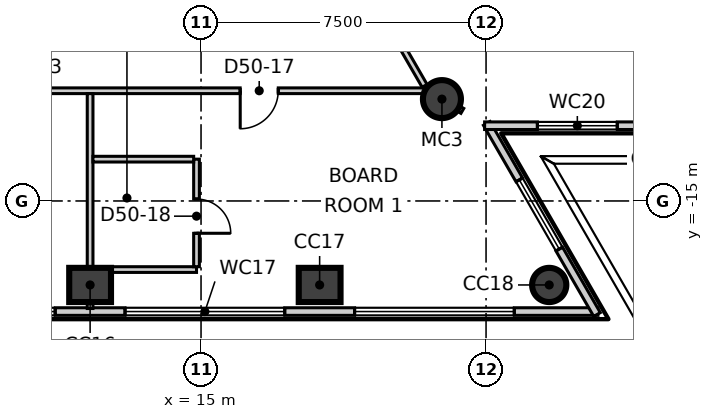
"""IFC4 building model, lengths in metres.
Left out: names, types, materials, properties, quantities, classifications, styles, units other than length and angle.
Written with IfcOpenShell. Run it as: python <this file> out.ifc"""

import sys

from ifc_helpers import new_model, si_unit, direction, frame, frame_2d, origin, origin_2d, place, context, subcontext, project, spatial, rectangle, circle, extrude, element, fill, save


model = new_model("IFC4")
c1 = context("Model", 3, precision=1e-05, world=origin(), true_north=direction((0.0, 1.0)))
c2 = subcontext(c1, "Body", "Model", "MODEL_VIEW")
j1 = project(units=[si_unit("LENGTHUNIT", "METRE"), si_unit("PLANEANGLEUNIT", "RADIAN")], contexts=[c1])
p1 = place(None, origin())
s1 = spatial("IfcSite", under=j1, at=p1, CompositionType="ELEMENT")
p2 = place(p1, origin())
s2 = spatial("IfcBuilding", under=s1, at=p2, CompositionType="ELEMENT")
p3 = place(p2, frame((0.0, 0.0, 215.3)))
s3 = spatial("IfcBuildingStorey", under=s2, at=p3, CompositionType="ELEMENT", Elevation=215.3)
for number, where, z_axis, x_axis in (
    (1, (12.081, -17.21, -0.3), (0.0, 0.0, 1.0), (1.0, 0.0, 0.0)),
    (2, (18.121, -17.21, -0.3), (0.0, 0.0, 1.0), (1.0, 0.0, 0.0)),
):
    element("IfcColumn", number, at=place(p3, frame(where, z_axis=z_axis, x_axis=x_axis)), inside=s3, PredefinedType="COLUMN", context=c2, shape_type="SweptSolid", body=[
        extrude(rectangle(XDim=1.1, YDim=0.9, at=origin_2d()), origin(), (0.0, 0.0, 1.0), 4.0),
    ])
p4 = place(p3, frame((24.162, -17.21, -0.3), z_axis=(0.0, 0.0, 1.0), x_axis=(1.0, 0.0, 0.0)))
e3 = element("IfcColumn", 3, at=p4, inside=s3, PredefinedType="COLUMN", context=c2, shape_type="SweptSolid", body=[
    extrude(circle(Radius=0.45, at=origin_2d()), origin(), (0.0, 0.0, 1.0), 4.0),
])
p5 = place(p3, frame((21.339, -12.32, -0.3), z_axis=(0.0, 0.0, 1.0), x_axis=(1.0, 0.0, 0.0)))
e4 = element("IfcColumn", 4, at=p5, inside=s3, PredefinedType="COLUMN", context=c2, shape_type="SweptSolid", body=[
    extrude(circle(Radius=0.5, at=origin_2d()), origin(), (0.0, 0.0, 1.0), 4.0),
])
p6 = place(p3, frame((-25.465, -17.91, 0.0), z_axis=(0.0, 0.0, 1.0), x_axis=(1.0, 0.0, 0.0)))
e5 = element("IfcWall", 5, at=p6, inside=s3, PredefinedType="ELEMENTEDWALL", context=c2, shape_type="SweptSolid", body=[
    extrude(rectangle(XDim=50.91, YDim=0.2, at=frame_2d((25.455, 0.0))), origin(), (0.0, 0.0, 1.0), 3.7),
])
p7 = place(p6, frame((2.223, 0.0, 0.9)))
e6 = element("IfcOpeningElement", 6, at=p7, cuts=e5, PredefinedType="OPENING", context=c2, shape_type="SweptSolid", body=[
    extrude(rectangle(XDim=4.2, YDim=2.5, at=frame_2d((2.1, 1.25))), frame((0.0, 0.11, 0.0), z_axis=(0.0, -1.0, 0.0), x_axis=(1.0, 0.0, 0.0)), (0.0, 0.0, 1.0), 0.22),
])
p8 = place(p6, frame((8.264, 0.0, 0.9)))
e7 = element("IfcOpeningElement", 7, at=p8, cuts=e5, PredefinedType="OPENING", context=c2, shape_type="SweptSolid", body=[
    extrude(rectangle(XDim=4.2, YDim=2.5, at=frame_2d((2.1, 1.25))), frame((0.0, 0.11, 0.0), z_axis=(0.0, -1.0, 0.0), x_axis=(1.0, 0.0, 0.0)), (0.0, 0.0, 1.0), 0.22),
])
p9 = place(p6, frame((14.304, 0.0, 0.9)))
e8 = element("IfcOpeningElement", 8, at=p9, cuts=e5, PredefinedType="OPENING", context=c2, shape_type="SweptSolid", body=[
    extrude(rectangle(XDim=4.2, YDim=2.5, at=frame_2d((2.1, 1.25))), frame((0.0, 0.11, 0.0), z_axis=(0.0, -1.0, 0.0), x_axis=(1.0, 0.0, 0.0)), (0.0, 0.0, 1.0), 0.22),
])
p10 = place(p6, frame((20.345, 0.0, 0.9)))
e9 = element("IfcOpeningElement", 9, at=p10, cuts=e5, PredefinedType="OPENING", context=c2, shape_type="SweptSolid", body=[
    extrude(rectangle(XDim=4.2, YDim=2.5, at=frame_2d((2.1, 1.25))), frame((0.0, 0.11, 0.0), z_axis=(0.0, -1.0, 0.0), x_axis=(1.0, 0.0, 0.0)), (0.0, 0.0, 1.0), 0.22),
])
p11 = place(p6, frame((26.385, 0.0, 0.9)))
e10 = element("IfcOpeningElement", 10, at=p11, cuts=e5, PredefinedType="OPENING", context=c2, shape_type="SweptSolid", body=[
    extrude(rectangle(XDim=4.2, YDim=2.5, at=frame_2d((2.1, 1.25))), frame((0.0, 0.11, 0.0), z_axis=(0.0, -1.0, 0.0), x_axis=(1.0, 0.0, 0.0)), (0.0, 0.0, 1.0), 0.22),
])
p12 = place(p6, frame((32.426, 0.0, 0.9)))
e11 = element("IfcOpeningElement", 11, at=p12, cuts=e5, PredefinedType="OPENING", context=c2, shape_type="SweptSolid", body=[
    extrude(rectangle(XDim=4.2, YDim=2.5, at=frame_2d((2.1, 1.25))), frame((0.0, 0.11, 0.0), z_axis=(0.0, -1.0, 0.0), x_axis=(1.0, 0.0, 0.0)), (0.0, 0.0, 1.0), 0.22),
])
p13 = place(p6, frame((38.466, 0.0, 0.9)))
e12 = element("IfcOpeningElement", 12, at=p13, cuts=e5, PredefinedType="OPENING", context=c2, shape_type="SweptSolid", body=[
    extrude(rectangle(XDim=4.2, YDim=2.5, at=frame_2d((2.1, 1.25))), frame((0.0, 0.11, 0.0), z_axis=(0.0, -1.0, 0.0), x_axis=(1.0, 0.0, 0.0)), (0.0, 0.0, 1.0), 0.22),
])
p14 = place(p6, frame((44.507, 0.0, 0.9)))
e13 = element("IfcOpeningElement", 13, at=p14, cuts=e5, PredefinedType="OPENING", context=c2, shape_type="SweptSolid", body=[
    extrude(rectangle(XDim=4.2, YDim=2.5, at=frame_2d((2.1, 1.25))), frame((0.0, 0.11, 0.0), z_axis=(0.0, -1.0, 0.0), x_axis=(1.0, 0.0, 0.0)), (0.0, 0.0, 1.0), 0.22),
])
p15 = place(p3, frame((25.42, -17.988, 0.0), z_axis=(0.0, 0.0, 1.0), x_axis=(-0.499910499212, 0.866077070922, 0.0)))
e14 = element("IfcWall", 14, at=p15, inside=s3, PredefinedType="ELEMENTEDWALL", context=c2, shape_type="SweptSolid", body=[
    extrude(rectangle(XDim=5.807, YDim=0.2, at=frame_2d((2.903, 0.0))), origin(), (0.0, 0.0, 1.0), 3.7),
])
p16 = place(p15, frame((1.99, 0.0, 0.9)))
e15 = element("IfcOpeningElement", 15, at=p16, cuts=e14, PredefinedType="OPENING", context=c2, shape_type="SweptSolid", body=[
    extrude(rectangle(XDim=2.1, YDim=2.5, at=frame_2d((1.05, 1.25))), frame((0.0, 0.11, 0.0), z_axis=(0.0, -1.0, 0.0), x_axis=(1.0, 0.0, 0.0)), (0.0, 0.0, 1.0), 0.22),
])
p17 = place(p3, frame((22.462, -13.02, 0.0), z_axis=(0.0, 0.0, 1.0), x_axis=(1.0, 0.0, 0.0)))
e16 = element("IfcWall", 16, at=p17, inside=s3, PredefinedType="ELEMENTEDWALL", context=c2, shape_type="SweptSolid", body=[
    extrude(rectangle(XDim=5.806, YDim=0.2, at=frame_2d((2.903, 0.0))), origin(), (0.0, 0.0, 1.0), 3.7),
])
p18 = place(p17, frame((1.39, 0.0, 0.9)))
e17 = element("IfcOpeningElement", 17, at=p18, cuts=e16, PredefinedType="OPENING", context=c2, shape_type="SweptSolid", body=[
    extrude(rectangle(XDim=2.1, YDim=2.5, at=frame_2d((1.05, 1.25))), frame((0.0, 0.11, 0.0), z_axis=(0.0, -1.0, 0.0), x_axis=(1.0, 0.0, 0.0)), (0.0, 0.0, 1.0), 0.22),
])
p19 = place(p3, frame((28.243, -13.098, 0.0), z_axis=(0.0, 0.0, 1.0), x_axis=(-0.500001688958, 0.866024428662, 0.0)))
e18 = element("IfcWall", 18, at=p19, inside=s3, PredefinedType="ELEMENTEDWALL", context=c2, shape_type="SweptSolid", body=[
    extrude(rectangle(XDim=50.909, YDim=0.2, at=frame_2d((25.455, 0.0))), origin(), (0.0, 0.0, 1.0), 3.7),
])
p20 = place(p19, frame((2.223, 0.0, 0.9)))
e19 = element("IfcOpeningElement", 19, at=p20, cuts=e18, PredefinedType="OPENING", context=c2, shape_type="SweptSolid", body=[
    extrude(rectangle(XDim=4.2, YDim=2.5, at=frame_2d((2.1, 1.25))), frame((0.0, 0.11, 0.0), z_axis=(0.0, -1.0, 0.0), x_axis=(1.0, 0.0, 0.0)), (0.0, 0.0, 1.0), 0.22),
])
p21 = place(p19, frame((8.263, 0.0, 0.9)))
e20 = element("IfcOpeningElement", 20, at=p21, cuts=e18, PredefinedType="OPENING", context=c2, shape_type="SweptSolid", body=[
    extrude(rectangle(XDim=4.2, YDim=2.5, at=frame_2d((2.1, 1.25))), frame((0.0, 0.11, 0.0), z_axis=(0.0, -1.0, 0.0), x_axis=(1.0, 0.0, 0.0)), (0.0, 0.0, 1.0), 0.22),
])
p22 = place(p19, frame((14.304, 0.0, 0.9)))
e21 = element("IfcOpeningElement", 21, at=p22, cuts=e18, PredefinedType="OPENING", context=c2, shape_type="SweptSolid", body=[
    extrude(rectangle(XDim=4.2, YDim=2.5, at=frame_2d((2.1, 1.25))), frame((0.0, 0.11, 0.0), z_axis=(0.0, -1.0, 0.0), x_axis=(1.0, 0.0, 0.0)), (0.0, 0.0, 1.0), 0.22),
])
p23 = place(p19, frame((20.345, 0.0, 0.9)))
e22 = element("IfcOpeningElement", 22, at=p23, cuts=e18, PredefinedType="OPENING", context=c2, shape_type="SweptSolid", body=[
    extrude(rectangle(XDim=4.2, YDim=2.5, at=frame_2d((2.1, 1.25))), frame((0.0, 0.11, 0.0), z_axis=(0.0, -1.0, 0.0), x_axis=(1.0, 0.0, 0.0)), (0.0, 0.0, 1.0), 0.22),
])
p24 = place(p19, frame((26.385, 0.0, 0.9)))
e23 = element("IfcOpeningElement", 23, at=p24, cuts=e18, PredefinedType="OPENING", context=c2, shape_type="SweptSolid", body=[
    extrude(rectangle(XDim=4.2, YDim=2.5, at=frame_2d((2.1, 1.25))), frame((0.0, 0.11, 0.0), z_axis=(0.0, -1.0, 0.0), x_axis=(1.0, 0.0, 0.0)), (0.0, 0.0, 1.0), 0.22),
])
p25 = place(p19, frame((32.426, 0.0, 0.9)))
e24 = element("IfcOpeningElement", 24, at=p25, cuts=e18, PredefinedType="OPENING", context=c2, shape_type="SweptSolid", body=[
    extrude(rectangle(XDim=4.2, YDim=2.5, at=frame_2d((2.1, 1.25))), frame((0.0, 0.11, 0.0), z_axis=(0.0, -1.0, 0.0), x_axis=(1.0, 0.0, 0.0)), (0.0, 0.0, 1.0), 0.22),
])
p26 = place(p19, frame((38.466, 0.0, 0.9)))
e25 = element("IfcOpeningElement", 25, at=p26, cuts=e18, PredefinedType="OPENING", context=c2, shape_type="SweptSolid", body=[
    extrude(rectangle(XDim=4.2, YDim=2.5, at=frame_2d((2.1, 1.25))), frame((0.0, 0.11, 0.0), z_axis=(0.0, -1.0, 0.0), x_axis=(1.0, 0.0, 0.0)), (0.0, 0.0, 1.0), 0.22),
])
p27 = place(p19, frame((44.507, 0.0, 0.9)))
e26 = element("IfcOpeningElement", 26, at=p27, cuts=e18, PredefinedType="OPENING", context=c2, shape_type="SweptSolid", body=[
    extrude(rectangle(XDim=4.2, YDim=2.5, at=frame_2d((2.1, 1.25))), frame((0.0, 0.11, 0.0), z_axis=(0.0, -1.0, 0.0), x_axis=(1.0, 0.0, 0.0)), (0.0, 0.0, 1.0), 0.22),
])
p28 = place(p3, frame((-20.808, -12.1, 0.0), z_axis=(0.0, 0.0, 1.0), x_axis=(1.0, 0.0, 0.0)))
e27 = element("IfcWall", 27, at=p28, inside=s3, PredefinedType="PARTITIONING", context=c2, shape_type="SweptSolid", body=[
    extrude(rectangle(XDim=41.766, YDim=0.15, at=frame_2d((20.883, 0.0))), origin(), (0.0, 0.0, 1.0), 3.7),
])
p29 = place(p28, frame((6.8, 0.0, 0.0)))
e28 = element("IfcOpeningElement", 28, at=p29, cuts=e27, PredefinedType="OPENING", context=c2, shape_type="SweptSolid", body=[
    extrude(rectangle(XDim=1.1, YDim=2.1, at=frame_2d((0.55, 1.05))), frame((0.0, 0.085, 0.0), z_axis=(0.0, -1.0, 0.0), x_axis=(1.0, 0.0, 0.0)), (0.0, 0.0, 1.0), 0.17),
])
p30 = place(p28, frame((17.317, 0.0, 0.0)))
e29 = element("IfcOpeningElement", 29, at=p30, cuts=e27, PredefinedType="OPENING", context=c2, shape_type="SweptSolid", body=[
    extrude(rectangle(XDim=1.0, YDim=2.1, at=frame_2d((0.5, 1.05))), frame((0.0, 0.085, 0.0), z_axis=(0.0, -1.0, 0.0), x_axis=(1.0, 0.0, 0.0)), (0.0, 0.0, 1.0), 0.17),
])
p31 = place(p28, frame((30.658, 0.0, 0.0)))
e30 = element("IfcOpeningElement", 30, at=p31, cuts=e27, PredefinedType="OPENING", context=c2, shape_type="SweptSolid", body=[
    extrude(rectangle(XDim=1.1, YDim=2.1, at=frame_2d((0.55, 1.05))), frame((0.0, 0.085, 0.0), z_axis=(0.0, -1.0, 0.0), x_axis=(1.0, 0.0, 0.0)), (0.0, 0.0, 1.0), 0.17),
])
p32 = place(p28, frame((21.958, 0.0, 0.0)))
e31 = element("IfcOpeningElement", 31, at=p32, cuts=e27, PredefinedType="OPENING", context=c2, shape_type="SweptSolid", body=[
    extrude(rectangle(XDim=0.9, YDim=2.1, at=frame_2d((0.45, 1.05))), frame((0.0, 0.085, 0.0), z_axis=(0.0, -1.0, 0.0), x_axis=(1.0, 0.0, 0.0)), (0.0, 0.0, 1.0), 0.17),
])
p33 = place(p28, frame((25.158, 0.0, 0.0)))
e32 = element("IfcOpeningElement", 32, at=p33, cuts=e27, PredefinedType="OPENING", context=c2, shape_type="SweptSolid", body=[
    extrude(rectangle(XDim=0.9, YDim=2.1, at=frame_2d((0.45, 1.05))), frame((0.0, 0.085, 0.0), z_axis=(0.0, -1.0, 0.0), x_axis=(1.0, 0.0, 0.0)), (0.0, 0.0, 1.0), 0.17),
])
p34 = place(p28, frame((27.958, 0.0, 0.0)))
e33 = element("IfcOpeningElement", 33, at=p34, cuts=e27, PredefinedType="OPENING", context=c2, shape_type="SweptSolid", body=[
    extrude(rectangle(XDim=1.0, YDim=2.1, at=frame_2d((0.5, 1.05))), frame((0.0, 0.085, 0.0), z_axis=(0.0, -1.0, 0.0), x_axis=(1.0, 0.0, 0.0)), (0.0, 0.0, 1.0), 0.17),
])
p35 = place(p28, frame((36.839, 0.0, 0.0)))
e34 = element("IfcOpeningElement", 34, at=p35, cuts=e27, PredefinedType="OPENING", context=c2, shape_type="SweptSolid", body=[
    extrude(rectangle(XDim=1.0, YDim=2.1, at=frame_2d((0.5, 1.05))), frame((0.0, 0.085, 0.0), z_axis=(0.0, -1.0, 0.0), x_axis=(1.0, 0.0, 0.0)), (0.0, 0.0, 1.0), 0.17),
])
p36 = place(p3, frame((21.087, -12.175, 0.0), z_axis=(0.0, 0.0, 1.0), x_axis=(0.866372959518, -0.499397532049, 0.0)))
e35 = element("IfcWall", 35, at=p36, inside=s3, PredefinedType="PARTITIONING", context=c2, shape_type="SweptSolid", body=[
    extrude(rectangle(XDim=0.911, YDim=0.15, at=frame_2d((0.455, 0.0))), origin(), (0.0, 0.0, 1.0), 3.7),
])
p37 = place(p3, frame((0.075, 24.07, 0.0), z_axis=(0.0, 0.0, 1.0), x_axis=(0.500006834213, -0.866021458014, 0.0)))
e36 = element("IfcWall", 36, at=p37, inside=s3, PredefinedType="PARTITIONING", context=c2, shape_type="SweptSolid", body=[
    extrude(rectangle(XDim=41.616, YDim=0.15, at=frame_2d((20.808, 0.0))), origin(), (0.0, 0.0, 1.0), 3.7),
])
p38 = place(p37, frame((33.715, 0.0, 0.0)))
e37 = element("IfcOpeningElement", 37, at=p38, cuts=e36, PredefinedType="OPENING", context=c2, shape_type="SweptSolid", body=[
    extrude(rectangle(XDim=1.1, YDim=2.1, at=frame_2d((0.55, 1.05))), frame((0.0, 0.085, 0.0), z_axis=(0.0, -1.0, 0.0), x_axis=(1.0, 0.0, 0.0)), (0.0, 0.0, 1.0), 0.17),
])
p39 = place(p37, frame((22.098, 0.0, 0.0)))
e38 = element("IfcOpeningElement", 38, at=p39, cuts=e36, PredefinedType="OPENING", context=c2, shape_type="SweptSolid", body=[
    extrude(rectangle(XDim=1.0, YDim=2.1, at=frame_2d((0.5, 1.05))), frame((0.0, 0.085, 0.0), z_axis=(0.0, -1.0, 0.0), x_axis=(1.0, 0.0, 0.0)), (0.0, 0.0, 1.0), 0.17),
])
p40 = place(p37, frame((25.198, 0.0, 0.0)))
e39 = element("IfcOpeningElement", 39, at=p40, cuts=e36, PredefinedType="OPENING", context=c2, shape_type="SweptSolid", body=[
    extrude(rectangle(XDim=0.9, YDim=2.1, at=frame_2d((0.45, 1.05))), frame((0.0, 0.085, 0.0), z_axis=(0.0, -1.0, 0.0), x_axis=(1.0, 0.0, 0.0)), (0.0, 0.0, 1.0), 0.17),
])
p41 = place(p37, frame((9.858, 0.0, 0.0)))
e40 = element("IfcOpeningElement", 40, at=p41, cuts=e36, PredefinedType="OPENING", context=c2, shape_type="SweptSolid", body=[
    extrude(rectangle(XDim=1.1, YDim=2.1, at=frame_2d((0.55, 1.05))), frame((0.0, 0.085, 0.0), z_axis=(0.0, -1.0, 0.0), x_axis=(1.0, 0.0, 0.0)), (0.0, 0.0, 1.0), 0.17),
])
p42 = place(p37, frame((18.758, 0.0, 0.0)))
e41 = element("IfcOpeningElement", 41, at=p42, cuts=e36, PredefinedType="OPENING", context=c2, shape_type="SweptSolid", body=[
    extrude(rectangle(XDim=0.9, YDim=2.1, at=frame_2d((0.45, 1.05))), frame((0.0, 0.085, 0.0), z_axis=(0.0, -1.0, 0.0), x_axis=(1.0, 0.0, 0.0)), (0.0, 0.0, 1.0), 0.17),
])
p43 = place(p37, frame((15.558, 0.0, 0.0)))
e42 = element("IfcOpeningElement", 42, at=p43, cuts=e36, PredefinedType="OPENING", context=c2, shape_type="SweptSolid", body=[
    extrude(rectangle(XDim=0.9, YDim=2.1, at=frame_2d((0.45, 1.05))), frame((0.0, 0.085, 0.0), z_axis=(0.0, -1.0, 0.0), x_axis=(1.0, 0.0, 0.0)), (0.0, 0.0, 1.0), 0.17),
])
p44 = place(p37, frame((12.658, 0.0, 0.0)))
e43 = element("IfcOpeningElement", 43, at=p44, cuts=e36, PredefinedType="OPENING", context=c2, shape_type="SweptSolid", body=[
    extrude(rectangle(XDim=1.0, YDim=2.1, at=frame_2d((0.5, 1.05))), frame((0.0, 0.085, 0.0), z_axis=(0.0, -1.0, 0.0), x_axis=(1.0, 0.0, 0.0)), (0.0, 0.0, 1.0), 0.17),
])
p45 = place(p37, frame((3.776, 0.0, 0.0)))
e44 = element("IfcOpeningElement", 44, at=p45, cuts=e36, PredefinedType="OPENING", context=c2, shape_type="SweptSolid", body=[
    extrude(rectangle(XDim=1.1, YDim=2.1, at=frame_2d((0.55, 1.05))), frame((0.0, 0.085, 0.0), z_axis=(0.0, -1.0, 0.0), x_axis=(1.0, 0.0, 0.0)), (0.0, 0.0, 1.0), 0.17),
])
p46 = place(p3, frame((12.081, -17.83, 0.0), z_axis=(0.0, 0.0, 1.0), x_axis=(0.0, 1.0, 0.0)))
e45 = element("IfcWall", 45, at=p46, inside=s3, PredefinedType="PARTITIONING", context=c2, shape_type="SweptSolid", body=[
    extrude(rectangle(XDim=5.655, YDim=0.15, at=frame_2d((2.828, 0.0))), origin(), (0.0, 0.0, 1.0), 3.7),
])
p47 = place(p3, frame((12.156, -16.805, 0.0), z_axis=(0.0, 0.0, 1.0), x_axis=(1.0, 0.0, 0.0)))
e46 = element("IfcWall", 46, at=p47, inside=s3, PredefinedType="PARTITIONING", context=c2, shape_type="SweptSolid", body=[
    extrude(rectangle(XDim=2.725, YDim=0.15, at=frame_2d((1.363, 0.0))), origin(), (0.0, 0.0, 1.0), 2.95),
])
p48 = place(p3, frame((14.881, -16.73, 0.0), z_axis=(0.0, 0.0, 1.0), x_axis=(0.0, 1.0, 0.0)))
e47 = element("IfcWall", 47, at=p48, inside=s3, PredefinedType="PARTITIONING", context=c2, shape_type="SweptSolid", body=[
    extrude(rectangle(XDim=2.83, YDim=0.15, at=frame_2d((1.415, 0.0))), origin(), (0.0, 0.0, 1.0), 3.7),
])
p49 = place(p48, frame((0.88, 0.0, 0.0)))
e48 = element("IfcOpeningElement", 48, at=p49, cuts=e47, PredefinedType="OPENING", context=c2, shape_type="SweptSolid", body=[
    extrude(rectangle(XDim=0.9, YDim=2.1, at=frame_2d((0.45, 1.05))), frame((0.0, 0.085, 0.0), z_axis=(0.0, -1.0, 0.0), x_axis=(1.0, 0.0, 0.0)), (0.0, 0.0, 1.0), 0.17),
])
p50 = place(p3, frame((12.156, -13.9, 0.0), z_axis=(0.0, 0.0, 1.0), x_axis=(1.0, 0.0, 0.0)))
e49 = element("IfcWall", 49, at=p50, inside=s3, PredefinedType="PARTITIONING", context=c2, shape_type="SweptSolid", body=[
    extrude(rectangle(XDim=2.65, YDim=0.15, at=frame_2d((1.325, 0.0))), origin(), (0.0, 0.0, 1.0), 3.7),
])
p51 = place(p12, origin())
e50 = element("IfcWindow", 50, at=p51, inside=s3, PartitioningType="SINGLE_PANEL", PredefinedType="WINDOW", context=c2, shape_type="SweptSolid", body=[
    extrude(rectangle(XDim=4.2, YDim=2.5, at=frame_2d((2.1, 1.25))), frame((0.0, 0.03, 0.0), z_axis=(0.0, -1.0, 0.0), x_axis=(1.0, 0.0, 0.0)), (0.0, 0.0, 1.0), 0.06),
])
fill(e11, e50)
p52 = place(p13, origin())
e51 = element("IfcWindow", 51, at=p52, inside=s3, PartitioningType="SINGLE_PANEL", PredefinedType="WINDOW", context=c2, shape_type="SweptSolid", body=[
    extrude(rectangle(XDim=4.2, YDim=2.5, at=frame_2d((2.1, 1.25))), frame((0.0, 0.03, 0.0), z_axis=(0.0, -1.0, 0.0), x_axis=(1.0, 0.0, 0.0)), (0.0, 0.0, 1.0), 0.06),
])
fill(e12, e51)
p53 = place(p14, origin())
e52 = element("IfcWindow", 52, at=p53, inside=s3, PartitioningType="SINGLE_PANEL", PredefinedType="WINDOW", context=c2, shape_type="SweptSolid", body=[
    extrude(rectangle(XDim=4.2, YDim=2.5, at=frame_2d((2.1, 1.25))), frame((0.0, 0.03, 0.0), z_axis=(0.0, -1.0, 0.0), x_axis=(1.0, 0.0, 0.0)), (0.0, 0.0, 1.0), 0.06),
])
fill(e13, e52)
p54 = place(p16, origin())
e53 = element("IfcWindow", 53, at=p54, inside=s3, PartitioningType="SINGLE_PANEL", PredefinedType="WINDOW", context=c2, shape_type="SweptSolid", body=[
    extrude(rectangle(XDim=2.1, YDim=2.5, at=frame_2d((1.05, 1.25))), frame((0.0, 0.03, 0.0), z_axis=(0.0, -1.0, 0.0), x_axis=(1.0, 0.0, 0.0)), (0.0, 0.0, 1.0), 0.06),
])
fill(e15, e53)
p55 = place(p18, origin())
e54 = element("IfcWindow", 54, at=p55, inside=s3, PartitioningType="SINGLE_PANEL", PredefinedType="WINDOW", context=c2, shape_type="SweptSolid", body=[
    extrude(rectangle(XDim=2.1, YDim=2.5, at=frame_2d((1.05, 1.25))), frame((0.0, 0.03, 0.0), z_axis=(0.0, -1.0, 0.0), x_axis=(1.0, 0.0, 0.0)), (0.0, 0.0, 1.0), 0.06),
])
fill(e17, e54)
p56 = place(p20, origin())
e55 = element("IfcWindow", 55, at=p56, inside=s3, PartitioningType="SINGLE_PANEL", PredefinedType="WINDOW", context=c2, shape_type="SweptSolid", body=[
    extrude(rectangle(XDim=4.2, YDim=2.5, at=frame_2d((2.1, 1.25))), frame((0.0, 0.03, 0.0), z_axis=(0.0, -1.0, 0.0), x_axis=(1.0, 0.0, 0.0)), (0.0, 0.0, 1.0), 0.06),
])
fill(e19, e55)
p57 = place(p35, origin())
e56 = element("IfcDoor", 56, at=p57, inside=s3, OperationType="SINGLE_SWING_LEFT", PredefinedType="DOOR", context=c2, shape_type="SweptSolid", body=[
    extrude(rectangle(XDim=1.0, YDim=2.1, at=frame_2d((0.5, 1.05))), frame((0.0, 0.025, 0.0), z_axis=(0.0, -1.0, 0.0), x_axis=(1.0, 0.0, 0.0)), (0.0, 0.0, 1.0), 0.05),
])
fill(e34, e56)
p58 = place(p49, origin())
e57 = element("IfcDoor", 57, at=p58, inside=s3, OperationType="SINGLE_SWING_LEFT", PredefinedType="DOOR", context=c2, shape_type="SweptSolid", body=[
    extrude(rectangle(XDim=0.9, YDim=2.1, at=frame_2d((0.45, 1.05))), frame((0.0, 0.025, 0.0), z_axis=(0.0, -1.0, 0.0), x_axis=(1.0, 0.0, 0.0)), (0.0, 0.0, 1.0), 0.05),
])
fill(e48, e57)
save(model, sys.argv[1])
